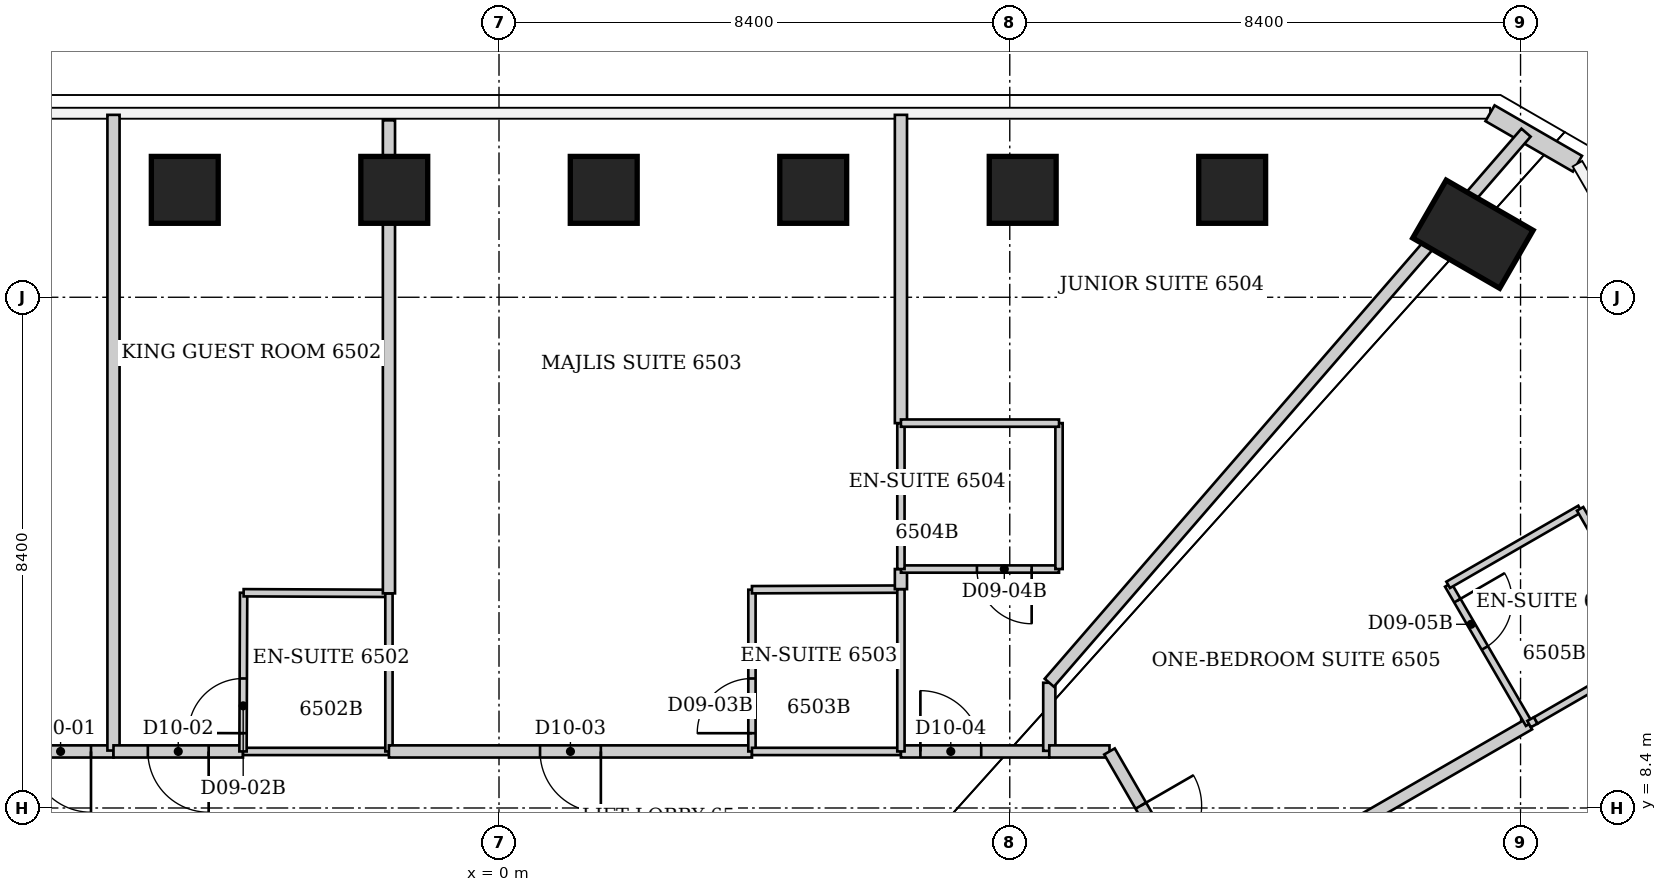
"""IFC4 building model, lengths in metres.
Left out: names, types, materials, properties, quantities, classifications, styles, units other than length and angle.
Written with IfcOpenShell. Run it as: python <this file> out.ifc"""

import sys

from ifc_helpers import new_model, si_unit, direction, frame, frame_2d, origin, origin_2d, place, context, subcontext, project, spatial, rectangle, extrude, element, fill, save


model = new_model("IFC4")
c1 = context("Model", 3, precision=1e-05, world=origin(), true_north=direction((0.0, 1.0)))
c2 = subcontext(c1, "Body", "Model", "MODEL_VIEW")
j1 = project(units=[si_unit("LENGTHUNIT", "METRE"), si_unit("PLANEANGLEUNIT", "RADIAN")], contexts=[c1])
p1 = place(None, origin())
s1 = spatial("IfcSite", under=j1, at=p1, CompositionType="ELEMENT")
p2 = place(p1, origin())
s2 = spatial("IfcBuilding", under=s1, at=p2, CompositionType="ELEMENT")
p3 = place(p2, frame((0.0, 0.0, 260.8)))
s3 = spatial("IfcBuildingStorey", under=s2, at=p3, CompositionType="ELEMENT", Elevation=260.8)
for number, where, z_axis, x_axis in (
    (1, (-5.167, 18.566, 0.0), (0.0, 0.0, 1.0), (0.0, 1.0, 0.0)),
    (2, (-1.722, 18.566, 0.0), (0.0, 0.0, 1.0), (0.0, 1.0, 0.0)),
    (3, (1.722, 18.566, 0.0), (0.0, 0.0, 1.0), (0.0, 1.0, 0.0)),
    (4, (5.167, 18.566, 0.0), (0.0, 0.0, 1.0), (0.0, 1.0, 0.0)),
    (5, (8.613, 18.566, 0.0), (0.0, 0.0, 1.0), (0.0, 1.0, 0.0)),
    (6, (12.058, 18.566, 0.0), (0.0, 0.0, 1.0), (0.0, 1.0, 0.0)),
):
    element("IfcColumn", number, at=place(p3, frame(where, z_axis=z_axis, x_axis=x_axis)), inside=s3, PredefinedType="COLUMN", context=c2, shape_type="SweptSolid", body=[
        extrude(rectangle(XDim=1.1, YDim=1.1, at=origin_2d()), origin(), (0.0, 0.0, 1.0), 3.8),
    ])
p4 = place(p3, frame((16.017, 17.837, 0.0), z_axis=(0.0, 0.0, 1.0), x_axis=(0.5, 0.866025403784, 0.0)))
e7 = element("IfcColumn", 7, at=p4, inside=s3, PredefinedType="COLUMN", context=c2, shape_type="SweptSolid", body=[
    extrude(rectangle(XDim=1.1, YDim=1.65, at=origin_2d()), origin(), (0.0, 0.0, 1.0), 3.8),
])
p5 = place(p3, frame((16.298, 19.826, 0.0), z_axis=(0.0, 0.0, 1.0), x_axis=(0.866026405774, -0.499998264499, 0.0)))
e8 = element("IfcWall", 8, at=p5, inside=s3, PredefinedType="SOLIDWALL", context=c2, shape_type="SweptSolid", body=[
    extrude(rectangle(XDim=1.66, YDim=0.3, at=frame_2d((0.83, 0.0))), origin(), (0.0, 0.0, 1.0), 3.64),
])
p6 = place(p3, frame((-6.34, 9.33, 0.0), z_axis=(0.0, 0.0, 1.0), x_axis=(-1.0, 0.0, 0.0)))
e9 = element("IfcWall", 9, at=p6, inside=s3, PredefinedType="PARTITIONING", context=c2, shape_type="SweptSolid", body=[
    extrude(rectangle(XDim=1.74, YDim=0.2, at=frame_2d((0.87, 0.0))), origin(), (0.0, 0.0, 1.0), 3.64),
])
p7 = place(p6, frame((0.37, 0.0, 0.0)))
e10 = element("IfcOpeningElement", 10, at=p7, cuts=e9, PredefinedType="OPENING", context=c2, shape_type="SweptSolid", body=[
    extrude(rectangle(XDim=1.0, YDim=2.13, at=frame_2d((0.5, 1.065))), frame((0.0, 0.1, 0.0), z_axis=(0.0, -1.0, 0.0), x_axis=(1.0, 0.0, 0.0)), (0.0, 0.0, 1.0), 0.2),
])
p8 = place(p3, frame((-6.34, 19.8, 0.0), z_axis=(0.0, 0.0, 1.0), x_axis=(0.0, -1.0, 0.0)))
e11 = element("IfcWall", 11, at=p8, inside=s3, PredefinedType="PARTITIONING", context=c2, shape_type="SweptSolid", body=[
    extrude(rectangle(XDim=10.455, YDim=0.2, at=frame_2d((5.228, 0.0))), origin(), (0.0, 0.0, 1.0), 3.64),
])
p9 = place(p3, frame((-4.21, 9.33, 0.0), z_axis=(0.0, 0.0, 1.0), x_axis=(-1.0, 0.0, 0.0)))
e12 = element("IfcWall", 12, at=p9, inside=s3, PredefinedType="PARTITIONING", context=c2, shape_type="SweptSolid", body=[
    extrude(rectangle(XDim=2.13, YDim=0.2, at=frame_2d((1.065, 0.0))), origin(), (0.0, 0.0, 1.0), 3.64),
])
p10 = place(p9, frame((0.565, 0.0, 0.0)))
e13 = element("IfcOpeningElement", 13, at=p10, cuts=e12, PredefinedType="OPENING", context=c2, shape_type="SweptSolid", body=[
    extrude(rectangle(XDim=1.0, YDim=2.13, at=frame_2d((0.5, 1.065))), frame((0.0, 0.1, 0.0), z_axis=(0.0, -1.0, 0.0), x_axis=(1.0, 0.0, 0.0)), (0.0, 0.0, 1.0), 0.2),
])
p11 = place(p3, frame((-4.21, 9.33, 0.0), z_axis=(0.0, 0.0, 1.0), x_axis=(1.0, 0.0, 0.0)))
e14 = element("IfcWall", 14, at=p11, inside=s3, PredefinedType="PARTITIONING", context=c2, shape_type="SweptSolid", body=[
    extrude(rectangle(XDim=2.4, YDim=0.12, at=frame_2d((1.2, 0.0))), origin(), (0.0, 0.0, 1.0), 3.64),
])
p12 = place(p3, frame((-4.2, 11.94, 0.0), z_axis=(0.0, 0.0, 1.0), x_axis=(-0.003835331941, -0.999992645087, 0.0)))
e15 = element("IfcWall", 15, at=p12, inside=s3, PredefinedType="PARTITIONING", context=c2, shape_type="SweptSolid", body=[
    extrude(rectangle(XDim=2.61, YDim=0.12, at=frame_2d((1.305, 0.0))), origin(), (0.0, 0.0, 1.0), 3.64),
])
p13 = place(p12, frame((1.41, 0.0, 0.0)))
e16 = element("IfcOpeningElement", 16, at=p13, cuts=e15, PredefinedType="OPENING", context=c2, shape_type="SweptSolid", body=[
    extrude(rectangle(XDim=0.9, YDim=2.03, at=frame_2d((0.45, 1.015))), frame((0.0, 0.06, 0.0), z_axis=(0.0, -1.0, 0.0), x_axis=(1.0, 0.0, 0.0)), (0.0, 0.0, 1.0), 0.12),
])
p14 = place(p3, frame((-1.81, 11.93, 0.0), z_axis=(0.0, 0.0, 1.0), x_axis=(-0.999991228874, 0.00418833797, 0.0)))
e17 = element("IfcWall", 17, at=p14, inside=s3, PredefinedType="PARTITIONING", context=c2, shape_type="SweptSolid", body=[
    extrude(rectangle(XDim=2.39, YDim=0.12, at=frame_2d((1.195, 0.0))), origin(), (0.0, 0.0, 1.0), 3.64),
])
p15 = place(p3, frame((-1.81, 11.93, 0.0), z_axis=(0.0, 0.0, 1.0), x_axis=(0.0, -1.0, 0.0)))
e18 = element("IfcWall", 18, at=p15, inside=s3, PredefinedType="PARTITIONING", context=c2, shape_type="SweptSolid", body=[
    extrude(rectangle(XDim=2.6, YDim=0.12, at=frame_2d((1.3, 0.0))), origin(), (0.0, 0.0, 1.0), 3.023),
])
p16 = place(p3, frame((-1.81, 19.71, 0.0), z_axis=(0.0, 0.0, 1.0), x_axis=(0.0, -1.0, 0.0)))
e19 = element("IfcWall", 19, at=p16, inside=s3, PredefinedType="PARTITIONING", context=c2, shape_type="SweptSolid", body=[
    extrude(rectangle(XDim=7.78, YDim=0.2, at=frame_2d((3.89, 0.0))), origin(), (0.0, 0.0, 1.0), 3.023),
])
p17 = place(p3, frame((4.16, 9.33, 0.0), z_axis=(0.0, 0.0, 1.0), x_axis=(-1.0, 0.0, 0.0)))
e20 = element("IfcWall", 20, at=p17, inside=s3, PredefinedType="PARTITIONING", context=c2, shape_type="SweptSolid", body=[
    extrude(rectangle(XDim=5.97, YDim=0.2, at=frame_2d((2.985, 0.0))), origin(), (0.0, 0.0, 1.0), 3.64),
])
p18 = place(p17, frame((2.485, 0.0, 0.0)))
e21 = element("IfcOpeningElement", 21, at=p18, cuts=e20, PredefinedType="OPENING", context=c2, shape_type="SweptSolid", body=[
    extrude(rectangle(XDim=1.0, YDim=2.13, at=frame_2d((0.5, 1.065))), frame((0.0, 0.1, 0.0), z_axis=(0.0, -1.0, 0.0), x_axis=(1.0, 0.0, 0.0)), (0.0, 0.0, 1.0), 0.2),
])
p19 = place(p3, frame((4.16, 11.99, 0.0), z_axis=(0.0, 0.0, 1.0), x_axis=(0.0, -1.0, 0.0)))
e22 = element("IfcWall", 22, at=p19, inside=s3, PredefinedType="PARTITIONING", context=c2, shape_type="SweptSolid", body=[
    extrude(rectangle(XDim=2.66, YDim=0.12, at=frame_2d((1.33, 0.0))), origin(), (0.0, 0.0, 1.0), 3.64),
])
p20 = place(p19, frame((1.46, 0.0, 0.0)))
e23 = element("IfcOpeningElement", 23, at=p20, cuts=e22, PredefinedType="OPENING", context=c2, shape_type="SweptSolid", body=[
    extrude(rectangle(XDim=0.9, YDim=2.03, at=frame_2d((0.45, 1.015))), frame((0.0, 0.06, 0.0), z_axis=(0.0, -1.0, 0.0), x_axis=(1.0, 0.0, 0.0)), (0.0, 0.0, 1.0), 0.12),
])
p21 = place(p3, frame((6.61, 9.33, 0.0), z_axis=(0.0, 0.0, 1.0), x_axis=(-1.0, 0.0, 0.0)))
e24 = element("IfcWall", 24, at=p21, inside=s3, PredefinedType="PARTITIONING", context=c2, shape_type="SweptSolid", body=[
    extrude(rectangle(XDim=2.45, YDim=0.12, at=frame_2d((1.225, 0.0))), origin(), (0.0, 0.0, 1.0), 3.64),
])
p22 = place(p3, frame((6.61, 9.33, 0.0), z_axis=(0.0, 0.0, 1.0), x_axis=(1.0, 0.0, 0.0)))
e25 = element("IfcWall", 25, at=p22, inside=s3, PredefinedType="PARTITIONING", context=c2, shape_type="SweptSolid", body=[
    extrude(rectangle(XDim=2.44, YDim=0.2, at=frame_2d((1.22, 0.0))), origin(), (0.0, 0.0, 1.0), 3.64),
])
p23 = place(p22, frame((0.32, 0.0, 0.0)))
e26 = element("IfcOpeningElement", 26, at=p23, cuts=e25, PredefinedType="OPENING", context=c2, shape_type="SweptSolid", body=[
    extrude(rectangle(XDim=1.0, YDim=2.13, at=frame_2d((0.5, 1.065))), frame((0.0, 0.1, 0.0), z_axis=(0.0, -1.0, 0.0), x_axis=(1.0, 0.0, 0.0)), (0.0, 0.0, 1.0), 0.2),
])
p24 = place(p3, frame((6.61, 12.0, 0.0), z_axis=(0.0, 0.0, 1.0), x_axis=(-0.999991655295, -0.004085258855, 0.0)))
e27 = element("IfcWall", 27, at=p24, inside=s3, PredefinedType="PARTITIONING", context=c2, shape_type="SweptSolid", body=[
    extrude(rectangle(XDim=2.45, YDim=0.12, at=frame_2d((1.225, 0.0))), origin(), (0.0, 0.0, 1.0), 3.64),
])
p25 = place(p3, frame((6.61, 12.0, 0.0), z_axis=(0.0, 0.0, 1.0), x_axis=(0.0, -1.0, 0.0)))
e28 = element("IfcWall", 28, at=p25, inside=s3, PredefinedType="PARTITIONING", context=c2, shape_type="SweptSolid", body=[
    extrude(rectangle(XDim=2.67, YDim=0.12, at=frame_2d((1.335, 0.0))), origin(), (0.0, 0.0, 1.0), 3.64),
])
p26 = place(p3, frame((6.61, 12.33, 0.0), z_axis=(0.0, 0.0, 1.0), x_axis=(0.0, -1.0, 0.0)))
e29 = element("IfcWall", 29, at=p26, inside=s3, PredefinedType="PARTITIONING", context=c2, shape_type="SweptSolid", body=[
    extrude(rectangle(XDim=0.33, YDim=0.2, at=frame_2d((0.165, 0.0))), origin(), (0.0, 0.0, 1.0), 3.64),
])
p27 = place(p3, frame((6.61, 12.33, 0.0), z_axis=(0.0, 0.0, 1.0), x_axis=(1.0, 0.0, 0.0)))
e30 = element("IfcWall", 30, at=p27, inside=s3, PredefinedType="PARTITIONING", context=c2, shape_type="SweptSolid", body=[
    extrude(rectangle(XDim=2.6, YDim=0.12, at=frame_2d((1.3, 0.0))), origin(), (0.0, 0.0, 1.0), 3.64),
])
p28 = place(p27, frame((1.25, 0.0, 0.0)))
e31 = element("IfcOpeningElement", 31, at=p28, cuts=e30, PredefinedType="OPENING", context=c2, shape_type="SweptSolid", body=[
    extrude(rectangle(XDim=0.9, YDim=2.03, at=frame_2d((0.45, 1.015))), frame((0.0, 0.06, 0.0), z_axis=(0.0, -1.0, 0.0), x_axis=(1.0, 0.0, 0.0)), (0.0, 0.0, 1.0), 0.12),
])
p29 = place(p3, frame((6.61, 14.73, 0.0), z_axis=(0.0, 0.0, 1.0), x_axis=(0.0, -1.0, 0.0)))
e32 = element("IfcWall", 32, at=p29, inside=s3, PredefinedType="PARTITIONING", context=c2, shape_type="SweptSolid", body=[
    extrude(rectangle(XDim=2.4, YDim=0.12, at=frame_2d((1.2, 0.0))), origin(), (0.0, 0.0, 1.0), 3.64),
])
p30 = place(p3, frame((6.61, 19.8, 0.0), z_axis=(0.0, 0.0, 1.0), x_axis=(0.0, -1.0, 0.0)))
e33 = element("IfcWall", 33, at=p30, inside=s3, PredefinedType="PARTITIONING", context=c2, shape_type="SweptSolid", body=[
    extrude(rectangle(XDim=5.07, YDim=0.2, at=frame_2d((2.535, 0.0))), origin(), (0.0, 0.0, 1.0), 3.64),
])
p31 = place(p3, frame((9.05, 10.46, 0.0), z_axis=(0.0, 0.0, 1.0), x_axis=(0.0, -1.0, 0.0)))
e34 = element("IfcWall", 34, at=p31, inside=s3, PredefinedType="PARTITIONING", context=c2, shape_type="SweptSolid", body=[
    extrude(rectangle(XDim=1.12, YDim=0.2, at=frame_2d((0.56, 0.0))), origin(), (0.0, 0.0, 1.0), 3.64),
])
p32 = place(p3, frame((9.21, 12.33, 0.0), z_axis=(0.0, 0.0, 1.0), x_axis=(0.0, 1.0, 0.0)))
e35 = element("IfcWall", 35, at=p32, inside=s3, PredefinedType="PARTITIONING", context=c2, shape_type="SweptSolid", body=[
    extrude(rectangle(XDim=2.4, YDim=0.12, at=frame_2d((1.2, 0.0))), origin(), (0.0, 0.0, 1.0), 3.64),
])
p33 = place(p3, frame((9.21, 14.73, 0.0), z_axis=(0.0, 0.0, 1.0), x_axis=(-1.0, 0.0, 0.0)))
e36 = element("IfcWall", 36, at=p33, inside=s3, PredefinedType="PARTITIONING", context=c2, shape_type="SweptSolid", body=[
    extrude(rectangle(XDim=2.6, YDim=0.12, at=frame_2d((1.3, 0.0))), origin(), (0.0, 0.0, 1.0), 3.64),
])
p34 = place(p3, frame((10.04, 9.33, 0.0), z_axis=(0.0, 0.0, 1.0), x_axis=(-1.0, 0.0, 0.0)))
e37 = element("IfcWall", 37, at=p34, inside=s3, PredefinedType="PARTITIONING", context=c2, shape_type="SweptSolid", body=[
    extrude(rectangle(XDim=0.99, YDim=0.2, at=frame_2d((0.495, 0.0))), origin(), (0.0, 0.0, 1.0), 3.64),
])
p35 = place(p3, frame((10.04, 9.33, 0.0), z_axis=(0.0, 0.0, 1.0), x_axis=(0.50033475521, -0.86583204649, 0.0)))
e38 = element("IfcWall", 38, at=p35, inside=s3, PredefinedType="PARTITIONING", context=c2, shape_type="SweptSolid", body=[
    extrude(rectangle(XDim=3.06, YDim=0.2, at=frame_2d((1.53, 0.0))), origin(), (0.0, 0.0, 1.0), 3.64),
])
p36 = place(p35, frame((1.03, 0.0, 0.0)))
e39 = element("IfcOpeningElement", 39, at=p36, cuts=e38, PredefinedType="OPENING", context=c2, shape_type="SweptSolid", body=[
    extrude(rectangle(XDim=1.0, YDim=2.13, at=frame_2d((0.5, 1.065))), frame((0.0, 0.1, 0.0), z_axis=(0.0, -1.0, 0.0), x_axis=(1.0, 0.0, 0.0)), (0.0, 0.0, 1.0), 0.2),
])
p37 = place(p3, frame((11.583, 6.688, 0.0), z_axis=(0.0, 0.0, 1.0), x_axis=(0.866046247233, 0.49996389635, 0.0)))
e40 = element("IfcWall", 40, at=p37, inside=s3, PredefinedType="PARTITIONING", context=c2, shape_type="SweptSolid", body=[
    extrude(rectangle(XDim=6.186, YDim=0.2, at=frame_2d((3.093, 0.0))), origin(), (0.0, 0.0, 1.0), 2.878),
])
p38 = place(p3, frame((15.61, 12.07, 0.0), z_axis=(0.0, 0.0, 1.0), x_axis=(0.502173326652, -0.864766991738, 0.0)))
e41 = element("IfcWall", 41, at=p38, inside=s3, PredefinedType="PARTITIONING", context=c2, shape_type="SweptSolid", body=[
    extrude(rectangle(XDim=2.648, YDim=0.12, at=frame_2d((1.324, 0.0))), origin(), (0.0, 0.0, 1.0), 3.64),
])
p39 = place(p38, frame((0.3, 0.0, 0.0)))
e42 = element("IfcOpeningElement", 42, at=p39, cuts=e41, PredefinedType="OPENING", context=c2, shape_type="SweptSolid", body=[
    extrude(rectangle(XDim=0.9, YDim=2.03, at=frame_2d((0.45, 1.015))), frame((0.0, 0.06, 0.0), z_axis=(0.0, -1.0, 0.0), x_axis=(1.0, 0.0, 0.0)), (0.0, 0.0, 1.0), 0.12),
])
p40 = place(p3, frame((16.89, 19.507, 0.0), z_axis=(0.0, 0.0, 1.0), x_axis=(-0.654896377117, -0.755718687899, 0.0)))
e43 = element("IfcWall", 43, at=p40, inside=s3, PredefinedType="PARTITIONING", context=c2, shape_type="SweptSolid", body=[
    extrude(rectangle(XDim=11.972, YDim=0.2, at=frame_2d((5.986, 0.0))), origin(), (0.0, 0.0, 1.0), 3.64),
])
p41 = place(p3, frame((16.94, 9.78, 0.0), z_axis=(0.0, 0.0, 1.0), x_axis=(0.877895572914, 0.478852130681, 0.0)))
e44 = element("IfcWall", 44, at=p41, inside=s3, PredefinedType="PARTITIONING", context=c2, shape_type="SweptSolid", body=[
    extrude(rectangle(XDim=0.125, YDim=0.12, at=frame_2d((0.063, 0.0))), origin(), (0.0, 0.0, 1.0), 3.64),
])
p42 = place(p3, frame((17.05, 9.84, 0.0), z_axis=(0.0, 0.0, 1.0), x_axis=(0.865741107356, 0.500492092878, 0.0)))
e45 = element("IfcWall", 45, at=p42, inside=s3, PredefinedType="PARTITIONING", context=c2, shape_type="SweptSolid", body=[
    extrude(rectangle(XDim=2.37, YDim=0.12, at=frame_2d((1.185, 0.0))), origin(), (0.0, 0.0, 1.0), 2.878),
])
p43 = place(p3, frame((17.78, 13.32, 0.0), z_axis=(0.0, 0.0, 1.0), x_axis=(-0.86653430447, -0.499117520406, 0.0)))
e46 = element("IfcWall", 46, at=p43, inside=s3, PredefinedType="PARTITIONING", context=c2, shape_type="SweptSolid", body=[
    extrude(rectangle(XDim=2.504, YDim=0.12, at=frame_2d((1.252, 0.0))), origin(), (0.0, 0.0, 1.0), 3.64),
])
p44 = place(p3, frame((19.1, 11.03, 0.0), z_axis=(0.0, 0.0, 1.0), x_axis=(-0.499407914056, 0.866366975004, 0.0)))
e47 = element("IfcWall", 47, at=p44, inside=s3, PredefinedType="PARTITIONING", context=c2, shape_type="SweptSolid", body=[
    extrude(rectangle(XDim=2.643, YDim=0.12, at=frame_2d((1.322, 0.0))), origin(), (0.0, 0.0, 1.0), 3.64),
])
p45 = place(p7, origin())
e48 = element("IfcDoor", 48, at=p45, inside=s3, OperationType="SINGLE_SWING_LEFT", PredefinedType="DOOR", context=c2, shape_type="SweptSolid", body=[
    extrude(rectangle(XDim=1.0, YDim=2.13, at=frame_2d((0.5, 1.065))), frame((0.0, 0.025, 0.0), z_axis=(0.0, -1.0, 0.0), x_axis=(1.0, 0.0, 0.0)), (0.0, 0.0, 1.0), 0.05),
])
fill(e10, e48)
p46 = place(p10, origin())
e49 = element("IfcDoor", 49, at=p46, inside=s3, OperationType="SINGLE_SWING_LEFT", PredefinedType="DOOR", context=c2, shape_type="SweptSolid", body=[
    extrude(rectangle(XDim=1.0, YDim=2.13, at=frame_2d((0.5, 1.065))), frame((0.0, 0.025, 0.0), z_axis=(0.0, -1.0, 0.0), x_axis=(1.0, 0.0, 0.0)), (0.0, 0.0, 1.0), 0.05),
])
fill(e13, e49)
p47 = place(p13, origin())
e50 = element("IfcDoor", 50, at=p47, inside=s3, OperationType="SINGLE_SWING_RIGHT", PredefinedType="DOOR", context=c2, shape_type="SweptSolid", body=[
    extrude(rectangle(XDim=0.9, YDim=2.03, at=frame_2d((0.45, 1.015))), frame((0.0, 0.025, 0.0), z_axis=(0.0, -1.0, 0.0), x_axis=(1.0, 0.0, 0.0)), (0.0, 0.0, 1.0), 0.05),
])
fill(e16, e50)
p48 = place(p18, origin())
e51 = element("IfcDoor", 51, at=p48, inside=s3, OperationType="SINGLE_SWING_LEFT", PredefinedType="DOOR", context=c2, shape_type="SweptSolid", body=[
    extrude(rectangle(XDim=1.0, YDim=2.13, at=frame_2d((0.5, 1.065))), frame((0.0, 0.025, 0.0), z_axis=(0.0, -1.0, 0.0), x_axis=(1.0, 0.0, 0.0)), (0.0, 0.0, 1.0), 0.05),
])
fill(e21, e51)
p49 = place(p20, origin())
e52 = element("IfcDoor", 52, at=p49, inside=s3, OperationType="SINGLE_SWING_RIGHT", PredefinedType="DOOR", context=c2, shape_type="SweptSolid", body=[
    extrude(rectangle(XDim=0.9, YDim=2.03, at=frame_2d((0.45, 1.015))), frame((0.0, 0.025, 0.0), z_axis=(0.0, -1.0, 0.0), x_axis=(1.0, 0.0, 0.0)), (0.0, 0.0, 1.0), 0.05),
])
fill(e23, e52)
p50 = place(p23, origin())
e53 = element("IfcDoor", 53, at=p50, inside=s3, OperationType="SINGLE_SWING_LEFT", PredefinedType="DOOR", context=c2, shape_type="SweptSolid", body=[
    extrude(rectangle(XDim=1.0, YDim=2.13, at=frame_2d((0.5, 1.065))), frame((0.0, 0.025, 0.0), z_axis=(0.0, -1.0, 0.0), x_axis=(1.0, 0.0, 0.0)), (0.0, 0.0, 1.0), 0.05),
])
fill(e26, e53)
p51 = place(p28, origin())
e54 = element("IfcDoor", 54, at=p51, inside=s3, OperationType="SINGLE_SWING_RIGHT", PredefinedType="DOOR", context=c2, shape_type="SweptSolid", body=[
    extrude(rectangle(XDim=0.9, YDim=2.03, at=frame_2d((0.45, 1.015))), frame((0.0, 0.025, 0.0), z_axis=(0.0, -1.0, 0.0), x_axis=(1.0, 0.0, 0.0)), (0.0, 0.0, 1.0), 0.05),
])
fill(e31, e54)
p52 = place(p36, origin())
e55 = element("IfcDoor", 55, at=p52, inside=s3, OperationType="SINGLE_SWING_LEFT", PredefinedType="DOOR", context=c2, shape_type="SweptSolid", body=[
    extrude(rectangle(XDim=1.0, YDim=2.13, at=frame_2d((0.5, 1.065))), frame((0.0, 0.025, 0.0), z_axis=(0.0, -1.0, 0.0), x_axis=(1.0, 0.0, 0.0)), (0.0, 0.0, 1.0), 0.05),
])
fill(e39, e55)
p53 = place(p39, origin())
e56 = element("IfcDoor", 56, at=p53, inside=s3, OperationType="SINGLE_SWING_LEFT", PredefinedType="DOOR", context=c2, shape_type="SweptSolid", body=[
    extrude(rectangle(XDim=0.9, YDim=2.03, at=frame_2d((0.45, 1.015))), frame((0.0, 0.025, 0.0), z_axis=(0.0, -1.0, 0.0), x_axis=(1.0, 0.0, 0.0)), (0.0, 0.0, 1.0), 0.05),
])
fill(e42, e56)
save(model, sys.argv[1])
